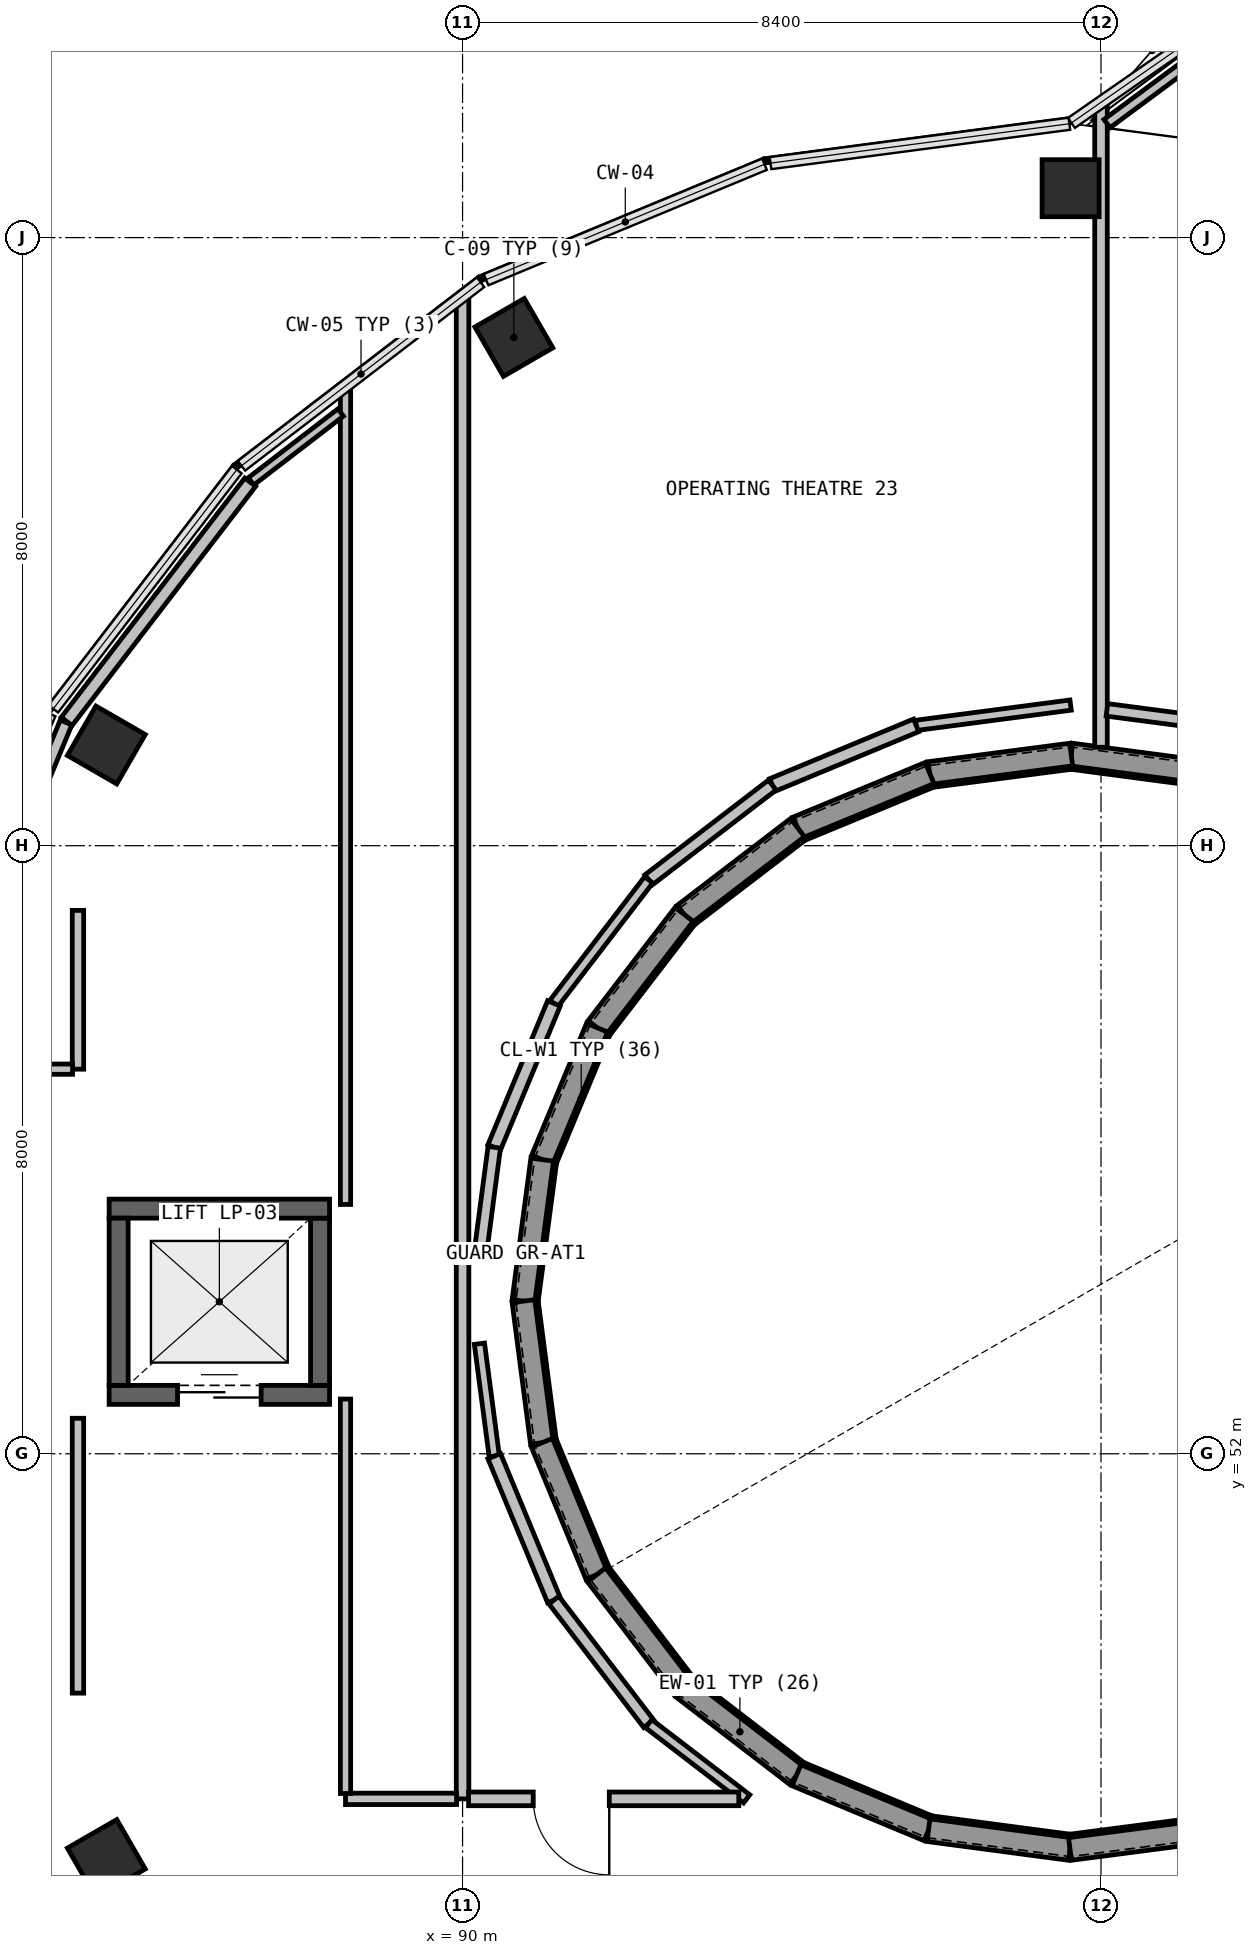
"""IFC4 building model, lengths in metres.
Left out: names, types, materials, properties, quantities, classifications, styles, units other than length and angle.
Written with IfcOpenShell. Run it as: python <this file> out.ifc"""

import sys

from ifc_helpers import new_model, si_unit, direction, frame, frame_2d, origin, origin_2d, place, context, subcontext, project, spatial, rectangle, circle, extrude, element, fill, save


model = new_model("IFC4")
c1 = context("Model", 3, precision=1e-05, world=origin(), true_north=direction((0.0, 1.0)))
c2 = subcontext(c1, "Body", "Model", "MODEL_VIEW")
j1 = project(units=[si_unit("LENGTHUNIT", "METRE"), si_unit("PLANEANGLEUNIT", "RADIAN")], contexts=[c1])
p1 = place(None, origin())
s1 = spatial("IfcSite", under=j1, at=p1, CompositionType="ELEMENT")
p2 = place(p1, origin())
s2 = spatial("IfcBuilding", under=s1, at=p2, CompositionType="ELEMENT")
p3 = place(p2, frame((0.0, 0.0, 10.2)))
s3 = spatial("IfcBuildingStorey", under=s2, at=p3, CompositionType="ELEMENT", Elevation=10.2)
for number, where, z_axis, x_axis in (
    (1, (98.0, 68.65, 0.0), (0.0, 0.0, 1.0), (0.0, 1.0, 0.0)),
    (2, (90.675, 66.687, 0.0), (0.0, 0.0, 1.0), (-0.5, 0.866, 0.0)),
    (3, (85.313, 61.325, 0.0), (0.0, 0.0, 1.0), (-0.866, 0.5, 0.0)),
    (4, (85.313, 46.675, 0.0), (0.0, 0.0, 1.0), (-0.866, -0.5, 0.0)),
):
    element("IfcColumn", number, at=place(p3, frame(where, z_axis=z_axis, x_axis=x_axis)), inside=s3, PredefinedType="COLUMN", context=c2, shape_type="SweptSolid", body=[
        extrude(circle(Radius=0.375, at=origin_2d()), origin(), (0.0, 0.0, 1.0), 4.8),
    ])
p4 = place(p3, frame((99.87, 60.952, 0.0), z_axis=(0.0, 0.0, 1.0), x_axis=(-0.991311701137, 0.131533688416, 0.0)))
e5 = element("IfcWall", 5, at=p4, inside=s3, PredefinedType="SOLIDWALL", context=c2, shape_type="SweptSolid", body=[
    extrude(rectangle(XDim=1.878, YDim=0.3, at=frame_2d((0.939, 0.0))), origin(), (0.0, 0.0, 1.0), 4.46),
])
p5 = place(p3, frame((98.008, 61.199, 0.0), z_axis=(0.0, 0.0, 1.0), x_axis=(-0.991606206969, -0.129294741965, 0.0)))
e6 = element("IfcWall", 6, at=p5, inside=s3, PredefinedType="SOLIDWALL", context=c2, shape_type="SweptSolid", body=[
    extrude(rectangle(XDim=1.879, YDim=0.3, at=frame_2d((0.939, 0.0))), origin(), (0.0, 0.0, 1.0), 4.46),
])
p6 = place(p3, frame((96.145, 60.956, 0.0), z_axis=(0.0, 0.0, 1.0), x_axis=(-0.924236528401, -0.381820428435, 0.0)))
e7 = element("IfcWall", 7, at=p6, inside=s3, PredefinedType="SOLIDWALL", context=c2, shape_type="SweptSolid", body=[
    extrude(rectangle(XDim=1.881, YDim=0.3, at=frame_2d((0.94, 0.0))), origin(), (0.0, 0.0, 1.0), 4.46),
])
p7 = place(p3, frame((94.407, 60.238, 0.0), z_axis=(0.0, 0.0, 1.0), x_axis=(-0.79405161161, -0.607850341861, 0.0)))
e8 = element("IfcWall", 8, at=p7, inside=s3, PredefinedType="SOLIDWALL", context=c2, shape_type="SweptSolid", body=[
    extrude(rectangle(XDim=1.879, YDim=0.3, at=frame_2d((0.939, 0.0))), origin(), (0.0, 0.0, 1.0), 4.46),
])
p8 = place(p3, frame((92.915, 59.096, 0.0), z_axis=(0.0, 0.0, 1.0), x_axis=(-0.609333966613, -0.792913688324, 0.0)))
e9 = element("IfcWall", 9, at=p8, inside=s3, PredefinedType="SOLIDWALL", context=c2, shape_type="SweptSolid", body=[
    extrude(rectangle(XDim=1.879, YDim=0.3, at=frame_2d((0.939, 0.0))), origin(), (0.0, 0.0, 1.0), 4.46),
])
p9 = place(p3, frame((91.77, 57.606, 0.0), z_axis=(0.0, 0.0, 1.0), x_axis=(-0.384006709406, -0.923330302292, 0.0)))
e10 = element("IfcWall", 10, at=p9, inside=s3, PredefinedType="SOLIDWALL", context=c2, shape_type="SweptSolid", body=[
    extrude(rectangle(XDim=1.88, YDim=0.3, at=frame_2d((0.94, 0.0))), origin(), (0.0, 0.0, 1.0), 4.46),
])
p10 = place(p3, frame((91.048, 55.87, 0.0), z_axis=(0.0, 0.0, 1.0), x_axis=(-0.131533688416, -0.991311701137, 0.0)))
e11 = element("IfcWall", 11, at=p10, inside=s3, PredefinedType="SOLIDWALL", context=c2, shape_type="SweptSolid", body=[
    extrude(rectangle(XDim=1.878, YDim=0.3, at=frame_2d((0.939, 0.0))), origin(), (0.0, 0.0, 1.0), 4.46),
])
p11 = place(p3, frame((90.801, 54.008, 0.0), z_axis=(0.0, 0.0, 1.0), x_axis=(0.129294741965, -0.991606206969, 0.0)))
e12 = element("IfcWall", 12, at=p11, inside=s3, PredefinedType="SOLIDWALL", context=c2, shape_type="SweptSolid", body=[
    extrude(rectangle(XDim=1.879, YDim=0.3, at=frame_2d((0.939, 0.0))), origin(), (0.0, 0.0, 1.0), 4.46),
])
p12 = place(p3, frame((91.044, 52.145, 0.0), z_axis=(0.0, 0.0, 1.0), x_axis=(0.381820428435, -0.924236528401, 0.0)))
e13 = element("IfcWall", 13, at=p12, inside=s3, PredefinedType="SOLIDWALL", context=c2, shape_type="SweptSolid", body=[
    extrude(rectangle(XDim=1.881, YDim=0.3, at=frame_2d((0.94, 0.0))), origin(), (0.0, 0.0, 1.0), 4.46),
])
p13 = place(p3, frame((91.762, 50.407, 0.0), z_axis=(0.0, 0.0, 1.0), x_axis=(0.607850341861, -0.79405161161, 0.0)))
e14 = element("IfcWall", 14, at=p13, inside=s3, PredefinedType="SOLIDWALL", context=c2, shape_type="SweptSolid", body=[
    extrude(rectangle(XDim=1.879, YDim=0.3, at=frame_2d((0.939, 0.0))), origin(), (0.0, 0.0, 1.0), 4.46),
])
p14 = place(p3, frame((92.904, 48.915, 0.0), z_axis=(0.0, 0.0, 1.0), x_axis=(0.792913688324, -0.609333966613, 0.0)))
e15 = element("IfcWall", 15, at=p14, inside=s3, PredefinedType="SOLIDWALL", context=c2, shape_type="SweptSolid", body=[
    extrude(rectangle(XDim=1.879, YDim=0.3, at=frame_2d((0.939, 0.0))), origin(), (0.0, 0.0, 1.0), 4.46),
])
p15 = place(p3, frame((94.394, 47.77, 0.0), z_axis=(0.0, 0.0, 1.0), x_axis=(0.923330302292, -0.384006709406, 0.0)))
e16 = element("IfcWall", 16, at=p15, inside=s3, PredefinedType="SOLIDWALL", context=c2, shape_type="SweptSolid", body=[
    extrude(rectangle(XDim=1.88, YDim=0.3, at=frame_2d((0.94, 0.0))), origin(), (0.0, 0.0, 1.0), 4.46),
])
p16 = place(p3, frame((96.13, 47.048, 0.0), z_axis=(0.0, 0.0, 1.0), x_axis=(0.991311701137, -0.131533688416, 0.0)))
e17 = element("IfcWall", 17, at=p16, inside=s3, PredefinedType="SOLIDWALL", context=c2, shape_type="SweptSolid", body=[
    extrude(rectangle(XDim=1.878, YDim=0.3, at=frame_2d((0.939, 0.0))), origin(), (0.0, 0.0, 1.0), 4.46),
])
p17 = place(p3, frame((97.992, 46.801, 0.0), z_axis=(0.0, 0.0, 1.0), x_axis=(0.991606206969, 0.129294741965, 0.0)))
e18 = element("IfcWall", 18, at=p17, inside=s3, PredefinedType="SOLIDWALL", context=c2, shape_type="SweptSolid", body=[
    extrude(rectangle(XDim=1.879, YDim=0.3, at=frame_2d((0.939, 0.0))), origin(), (0.0, 0.0, 1.0), 4.46),
])
p18 = place(p3, frame((85.35, 52.775, 0.0), z_axis=(0.0, 0.0, 1.0), x_axis=(1.0, 0.0, 0.0)))
e19 = element("IfcWall", 19, at=p18, inside=s3, PredefinedType="SHEAR", context=c2, shape_type="SweptSolid", body=[
    extrude(rectangle(XDim=2.9, YDim=0.25, at=frame_2d((1.45, 0.0))), origin(), (0.0, 0.0, 1.0), 4.46),
])
p19 = place(p18, frame((0.9, 0.0, 0.0)))
e20 = element("IfcOpeningElement", 20, at=p19, cuts=e19, PredefinedType="OPENING", context=c2, shape_type="SweptSolid", body=[
    extrude(rectangle(XDim=1.1, YDim=2.15, at=frame_2d((0.55, 1.075))), frame((0.0, 0.135, 0.0), z_axis=(0.0, -1.0, 0.0), x_axis=(1.0, 0.0, 0.0)), (0.0, 0.0, 1.0), 0.27),
])
p20 = place(p3, frame((88.125, 52.9, 0.0), z_axis=(0.0, 0.0, 1.0), x_axis=(0.0, 1.0, 0.0)))
e21 = element("IfcWall", 21, at=p20, inside=s3, PredefinedType="SHEAR", context=c2, shape_type="SweptSolid", body=[
    extrude(rectangle(XDim=2.2, YDim=0.25, at=frame_2d((1.1, 0.0))), origin(), (0.0, 0.0, 1.0), 4.46),
])
p21 = place(p3, frame((88.25, 55.225, 0.0), z_axis=(0.0, 0.0, 1.0), x_axis=(-1.0, 0.0, 0.0)))
e22 = element("IfcWall", 22, at=p21, inside=s3, PredefinedType="SHEAR", context=c2, shape_type="SweptSolid", body=[
    extrude(rectangle(XDim=2.9, YDim=0.25, at=frame_2d((1.45, 0.0))), origin(), (0.0, 0.0, 1.0), 4.46),
])
p22 = place(p3, frame((85.475, 55.1, 0.0), z_axis=(0.0, 0.0, 1.0), x_axis=(0.0, -1.0, 0.0)))
e23 = element("IfcWall", 23, at=p22, inside=s3, PredefinedType="SHEAR", context=c2, shape_type="SweptSolid", body=[
    extrude(rectangle(XDim=2.2, YDim=0.25, at=frame_2d((1.1, 0.0))), origin(), (0.0, 0.0, 1.0), 4.46),
])
p23 = place(p3, frame((84.94, 52.467, 0.0), z_axis=(0.0, 0.0, 1.0), x_axis=(0.0, -1.0, 0.0)))
e24 = element("IfcWall", 24, at=p23, inside=s3, PredefinedType="PARTITIONING", context=c2, shape_type="SweptSolid", body=[
    extrude(rectangle(XDim=3.616, YDim=0.15, at=frame_2d((1.808, 0.0))), origin(), (0.0, 0.0, 1.0), 4.46),
])
p24 = place(p3, frame((88.46, 55.28, 0.0), z_axis=(0.0, 0.0, 1.0), x_axis=(0.0, 1.0, 0.0)))
e25 = element("IfcWall", 25, at=p24, inside=s3, PredefinedType="PARTITIONING", context=c2, shape_type="SweptSolid", body=[
    extrude(rectangle(XDim=10.755, YDim=0.135, at=frame_2d((5.377, 0.0))), origin(), (0.0, 0.0, 1.0), 4.46),
])
p25 = place(p3, frame((88.396, 65.699, 0.0), z_axis=(0.0, 0.0, 1.0), x_axis=(-0.792910789571, -0.609337738682, 0.0)))
e26 = element("IfcWall", 26, at=p25, inside=s3, PredefinedType="PARTITIONING", context=c2, shape_type="SweptSolid", body=[
    extrude(rectangle(XDim=1.487, YDim=0.12, at=frame_2d((0.743, 0.0))), origin(), (0.0, 0.0, 1.0), 4.46),
])
p26 = place(p3, frame((87.206, 64.782, 0.0), z_axis=(0.0, 0.0, 1.0), x_axis=(-0.608806174349, -0.793319003979, 0.0)))
e27 = element("IfcWall", 27, at=p26, inside=s3, PredefinedType="PARTITIONING", context=c2, shape_type="SweptSolid", body=[
    extrude(rectangle(XDim=3.967, YDim=0.18, at=frame_2d((1.983, 0.0))), origin(), (0.0, 0.0, 1.0), 4.46),
])
p27 = place(p3, frame((84.783, 61.621, 0.0), z_axis=(0.0, 0.0, 1.0), x_axis=(-0.382660915668, -0.923888858911, 0.0)))
e28 = element("IfcWall", 28, at=p27, inside=s3, PredefinedType="PARTITIONING", context=c2, shape_type="SweptSolid", body=[
    extrude(rectangle(XDim=1.837, YDim=0.165, at=frame_2d((0.918, 0.0))), origin(), (0.0, 0.0, 1.0), 4.46),
])
p28 = place(p3, frame((84.94, 59.149, 0.0), z_axis=(0.0, 0.0, 1.0), x_axis=(0.0, -1.0, 0.0)))
e29 = element("IfcWall", 29, at=p28, inside=s3, PredefinedType="PARTITIONING", context=c2, shape_type="SweptSolid", body=[
    extrude(rectangle(XDim=2.089, YDim=0.15, at=frame_2d((1.044, 0.0))), origin(), (0.0, 0.0, 1.0), 4.46),
])
p29 = place(p3, frame((84.869, 57.06, 0.0), z_axis=(0.0, 0.0, 1.0), x_axis=(-1.0, 0.0, 0.0)))
e30 = element("IfcWall", 30, at=p29, inside=s3, PredefinedType="PARTITIONING", context=c2, shape_type="SweptSolid", body=[
    extrude(rectangle(XDim=11.583, YDim=0.135, at=frame_2d((5.792, 0.0))), origin(), (0.0, 0.0, 1.0), 4.46),
])
p30 = place(p29, frame((5.091, 0.0, 0.0)))
e31 = element("IfcOpeningElement", 31, at=p30, cuts=e30, PredefinedType="OPENING", context=c2, shape_type="SweptSolid", body=[
    extrude(rectangle(XDim=1.4, YDim=2.15, at=frame_2d((0.7, 1.075))), frame((0.0, 0.077, 0.0), z_axis=(0.0, -1.0, 0.0), x_axis=(1.0, 0.0, 0.0)), (0.0, 0.0, 1.0), 0.155),
])
p31 = place(p3, frame((90.0, 67.217, 0.0), z_axis=(0.0, 0.0, 1.0), x_axis=(0.0, -1.0, 0.0)))
e32 = element("IfcWall", 32, at=p31, inside=s3, PredefinedType="PARTITIONING", context=c2, shape_type="SweptSolid", body=[
    extrude(rectangle(XDim=19.757, YDim=0.165, at=frame_2d((9.878, 0.0))), origin(), (0.0, 0.0, 1.0), 4.46),
])
p32 = place(p3, frame((89.921, 47.46, 0.0), z_axis=(0.0, 0.0, 1.0), x_axis=(-1.0, 0.0, 0.0)))
e33 = element("IfcWall", 33, at=p32, inside=s3, PredefinedType="PARTITIONING", context=c2, shape_type="SweptSolid", body=[
    extrude(rectangle(XDim=1.461, YDim=0.15, at=frame_2d((0.73, 0.0))), origin(), (0.0, 0.0, 1.0), 4.46),
])
p33 = place(p3, frame((88.46, 47.531, 0.0), z_axis=(0.0, 0.0, 1.0), x_axis=(0.0, 1.0, 0.0)))
e34 = element("IfcWall", 34, at=p33, inside=s3, PredefinedType="PARTITIONING", context=c2, shape_type="SweptSolid", body=[
    extrude(rectangle(XDim=5.189, YDim=0.135, at=frame_2d((2.594, 0.0))), origin(), (0.0, 0.0, 1.0), 4.46),
])
p34 = place(p3, frame((98.0, 61.85, 0.0), z_axis=(0.0, 0.0, 1.0), x_axis=(-0.991471721493, -0.130322006886, 0.0)))
e35 = element("IfcWall", 35, at=p34, inside=s3, PredefinedType="PARTITIONING", context=c2, shape_type="SweptSolid", body=[
    extrude(rectangle(XDim=2.05, YDim=0.135, at=frame_2d((1.025, 0.0))), origin(), (0.0, 0.0, 1.0), 4.46),
])
p35 = place(p3, frame((95.968, 61.583, 0.0), z_axis=(0.0, 0.0, 1.0), x_axis=(-0.923745197655, -0.383007584532, 0.0)))
e36 = element("IfcWall", 36, at=p35, inside=s3, PredefinedType="PARTITIONING", context=c2, shape_type="SweptSolid", body=[
    extrude(rectangle(XDim=2.049, YDim=0.18, at=frame_2d((1.025, 0.0))), origin(), (0.0, 0.0, 1.0), 4.46),
])
p36 = place(p3, frame((94.075, 60.798, 0.0), z_axis=(0.0, 0.0, 1.0), x_axis=(-0.793491289639, -0.608581607729, 0.0)))
e37 = element("IfcWall", 37, at=p36, inside=s3, PredefinedType="PARTITIONING", context=c2, shape_type="SweptSolid", body=[
    extrude(rectangle(XDim=2.049, YDim=0.165, at=frame_2d((1.024, 0.0))), origin(), (0.0, 0.0, 1.0), 4.46),
])
p37 = place(p3, frame((92.449, 59.551, 0.0), z_axis=(0.0, 0.0, 1.0), x_axis=(-0.608581607729, -0.793491289639, 0.0)))
e38 = element("IfcWall", 38, at=p37, inside=s3, PredefinedType="PARTITIONING", context=c2, shape_type="SweptSolid", body=[
    extrude(rectangle(XDim=2.049, YDim=0.135, at=frame_2d((1.024, 0.0))), origin(), (0.0, 0.0, 1.0), 4.46),
])
p38 = place(p3, frame((91.202, 57.925, 0.0), z_axis=(0.0, 0.0, 1.0), x_axis=(-0.383007584532, -0.923745197655, 0.0)))
e39 = element("IfcWall", 39, at=p38, inside=s3, PredefinedType="PARTITIONING", context=c2, shape_type="SweptSolid", body=[
    extrude(rectangle(XDim=2.049, YDim=0.18, at=frame_2d((1.025, 0.0))), origin(), (0.0, 0.0, 1.0), 4.46),
])
p39 = place(p3, frame((90.417, 56.032, 0.0), z_axis=(0.0, 0.0, 1.0), x_axis=(-0.130674502542, -0.991425324664, 0.0)))
e40 = element("IfcWall", 40, at=p39, inside=s3, PredefinedType="PARTITIONING", context=c2, shape_type="SweptSolid", body=[
    extrude(rectangle(XDim=1.493, YDim=0.165, at=frame_2d((0.746, 0.0))), origin(), (0.0, 0.0, 1.0), 4.46),
])
p40 = place(p3, frame((90.222, 53.448, 0.0), z_axis=(0.0, 0.0, 1.0), x_axis=(0.130674502542, -0.991425324664, 0.0)))
e41 = element("IfcWall", 41, at=p40, inside=s3, PredefinedType="PARTITIONING", context=c2, shape_type="SweptSolid", body=[
    extrude(rectangle(XDim=1.493, YDim=0.135, at=frame_2d((0.746, 0.0))), origin(), (0.0, 0.0, 1.0), 4.46),
])
p41 = place(p3, frame((90.417, 51.968, 0.0), z_axis=(0.0, 0.0, 1.0), x_axis=(0.383007584532, -0.923745197655, 0.0)))
e42 = element("IfcWall", 42, at=p41, inside=s3, PredefinedType="PARTITIONING", context=c2, shape_type="SweptSolid", body=[
    extrude(rectangle(XDim=2.049, YDim=0.18, at=frame_2d((1.025, 0.0))), origin(), (0.0, 0.0, 1.0), 4.46),
])
p42 = place(p3, frame((91.202, 50.075, 0.0), z_axis=(0.0, 0.0, 1.0), x_axis=(0.608581607729, -0.793491289639, 0.0)))
e43 = element("IfcWall", 43, at=p42, inside=s3, PredefinedType="PARTITIONING", context=c2, shape_type="SweptSolid", body=[
    extrude(rectangle(XDim=2.049, YDim=0.165, at=frame_2d((1.024, 0.0))), origin(), (0.0, 0.0, 1.0), 4.46),
])
p43 = place(p3, frame((92.449, 48.449, 0.0), z_axis=(0.0, 0.0, 1.0), x_axis=(0.793388644719, -0.60871541662, 0.0)))
e44 = element("IfcWall", 44, at=p43, inside=s3, PredefinedType="PARTITIONING", context=c2, shape_type="SweptSolid", body=[
    extrude(rectangle(XDim=1.625, YDim=0.135, at=frame_2d((0.812, 0.0))), origin(), (0.0, 0.0, 1.0), 4.46),
])
p44 = place(p3, frame((93.634, 47.46, 0.0), z_axis=(0.0, 0.0, 1.0), x_axis=(-1.0, 0.0, 0.0)))
e45 = element("IfcWall", 45, at=p44, inside=s3, PredefinedType="PARTITIONING", context=c2, shape_type="SweptSolid", body=[
    extrude(rectangle(XDim=3.555, YDim=0.18, at=frame_2d((1.777, 0.0))), origin(), (0.0, 0.0, 1.0), 4.46),
])
p45 = place(p44, frame((1.704, 0.0, 0.0)))
e46 = element("IfcOpeningElement", 46, at=p45, cuts=e45, PredefinedType="OPENING", context=c2, shape_type="SweptSolid", body=[
    extrude(rectangle(XDim=1.0, YDim=2.15, at=frame_2d((0.5, 1.075))), frame((0.0, 0.1, 0.0), z_axis=(0.0, -1.0, 0.0), x_axis=(1.0, 0.0, 0.0)), (0.0, 0.0, 1.0), 0.2),
])
p46 = place(p3, frame((98.4, 69.766, 0.0), z_axis=(0.0, 0.0, 1.0), x_axis=(0.0, -1.0, 0.0)))
e47 = element("IfcWall", 47, at=p46, inside=s3, PredefinedType="PARTITIONING", context=c2, shape_type="SweptSolid", body=[
    extrude(rectangle(XDim=8.471, YDim=0.165, at=frame_2d((4.236, 0.0))), origin(), (0.0, 0.0, 1.0), 4.46),
])
p47 = place(p3, frame((100.032, 61.583, 0.0), z_axis=(0.0, 0.0, 1.0), x_axis=(-0.991473913665, 0.130305328065, 0.0)))
e48 = element("IfcWall", 48, at=p47, inside=s3, PredefinedType="PARTITIONING", context=c2, shape_type="SweptSolid", body=[
    extrude(rectangle(XDim=1.566, YDim=0.165, at=frame_2d((0.783, 0.0))), origin(), (0.0, 0.0, 1.0), 4.46),
])
p48 = place(p3, frame((98.479, 69.5, 0.0), z_axis=(0.0, 0.0, 1.0), x_axis=(0.803937569327, 0.594713699711, 0.0)))
e49 = element("IfcWall", 49, at=p48, inside=s3, PredefinedType="PARTITIONING", context=c2, shape_type="SweptSolid", body=[
    extrude(rectangle(XDim=4.148, YDim=0.135, at=frame_2d((2.074, 0.0))), origin(), (0.0, 0.0, 1.0), 4.46),
])
p49 = place(p19, origin())
e50 = element("IfcDoor", 50, at=p49, inside=s3, OperationType="DOUBLE_DOOR_SLIDING", PredefinedType="DOOR", context=c2, shape_type="SweptSolid", body=[
    extrude(rectangle(XDim=1.1, YDim=2.15, at=frame_2d((0.55, 1.075))), frame((0.0, 0.025, 0.0), z_axis=(0.0, -1.0, 0.0), x_axis=(1.0, 0.0, 0.0)), (0.0, 0.0, 1.0), 0.05),
])
fill(e20, e50)
p50 = place(p45, origin())
e51 = element("IfcDoor", 51, at=p50, inside=s3, OperationType="SINGLE_SWING_LEFT", PredefinedType="DOOR", context=c2, shape_type="SweptSolid", body=[
    extrude(rectangle(XDim=1.0, YDim=2.15, at=frame_2d((0.5, 1.075))), frame((0.0, 0.025, 0.0), z_axis=(0.0, -1.0, 0.0), x_axis=(1.0, 0.0, 0.0)), (0.0, 0.0, 1.0), 0.05),
])
fill(e46, e51)
save(model, sys.argv[1])
